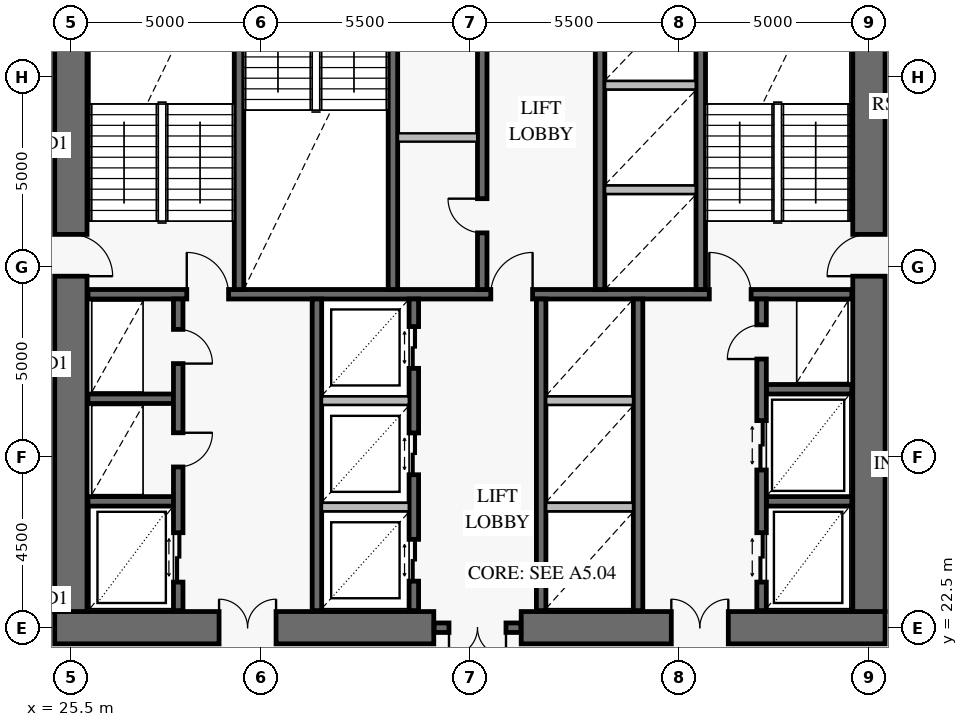
"""IFC4 building model, lengths in metres.
Left out: names, types, materials, properties, quantities, classifications, styles, units other than length and angle.
Written with IfcOpenShell. Run it as: python <this file> out.ifc"""

import sys

from ifc_helpers import new_model, si_unit, direction, frame, frame_2d, origin, place, context, subcontext, project, spatial, rectangle, extrude, element, fill, save


model = new_model("IFC4")
c1 = context("Model", 3, precision=1e-05, world=origin(), true_north=direction((0.0, 1.0)))
c2 = subcontext(c1, "Body", "Model", "MODEL_VIEW")
j1 = project(units=[si_unit("LENGTHUNIT", "METRE"), si_unit("PLANEANGLEUNIT", "RADIAN")], contexts=[c1])
p1 = place(None, origin())
s1 = spatial("IfcSite", under=j1, at=p1, CompositionType="ELEMENT")
p2 = place(p1, origin())
s2 = spatial("IfcBuilding", under=s1, at=p2, CompositionType="ELEMENT")
p3 = place(p2, frame((0.0, 0.0, 12.0)))
s3 = spatial("IfcBuildingStorey", under=s2, at=p3, CompositionType="ELEMENT", Elevation=12.0)
p4 = place(p3, frame((25.075, 22.5, 0.0), z_axis=(0.0, 0.0, 1.0), x_axis=(1.0, 0.0, 0.0)))
e1 = element("IfcWall", 1, at=p4, inside=s3, PredefinedType="SHEAR", context=c2, shape_type="SweptSolid", body=[
    extrude(rectangle(XDim=9.975, YDim=0.85, at=frame_2d((4.988, 0.0))), origin(), (0.0, 0.0, 1.0), 4.2),
])
p5 = place(p4, frame((4.325, 0.0, 0.0)))
e2 = element("IfcOpeningElement", 2, at=p5, cuts=e1, PredefinedType="OPENING", context=c2, shape_type="SweptSolid", body=[
    extrude(rectangle(XDim=1.5, YDim=2.15, at=frame_2d((0.75, 1.075))), frame((0.0, 0.437, 0.0), z_axis=(0.0, -1.0, 0.0), x_axis=(1.0, 0.0, 0.0)), (0.0, 0.0, 1.0), 0.874),
])
p6 = place(p3, frame((37.35, 22.5, 0.0), z_axis=(0.0, 0.0, 1.0), x_axis=(1.0, 0.0, 0.0)))
e3 = element("IfcWall", 3, at=p6, inside=s3, PredefinedType="SHEAR", context=c2, shape_type="SweptSolid", body=[
    extrude(rectangle(XDim=9.575, YDim=0.85, at=frame_2d((4.788, 0.0))), origin(), (0.0, 0.0, 1.0), 4.2),
])
p7 = place(p6, frame((3.95, 0.0, 0.0)))
e4 = element("IfcOpeningElement", 4, at=p7, cuts=e3, PredefinedType="OPENING", context=c2, shape_type="SweptSolid", body=[
    extrude(rectangle(XDim=1.5, YDim=2.15, at=frame_2d((0.75, 1.075))), frame((0.0, 0.437, 0.0), z_axis=(0.0, -1.0, 0.0), x_axis=(1.0, 0.0, 0.0)), (0.0, 0.0, 1.0), 0.874),
])
p8 = place(p3, frame((25.5, 22.925, 0.0), z_axis=(0.0, 0.0, 1.0), x_axis=(0.0, 1.0, 0.0)))
e5 = element("IfcWall", 5, at=p8, inside=s3, PredefinedType="SHEAR", context=c2, shape_type="SweptSolid", body=[
    extrude(rectangle(XDim=18.15, YDim=0.85, at=frame_2d((9.075, 0.0))), origin(), (0.0, 0.0, 1.0), 4.2),
])
p9 = place(p8, frame((8.825, 0.0, 0.0)))
e6 = element("IfcOpeningElement", 6, at=p9, cuts=e5, PredefinedType="OPENING", context=c2, shape_type="SweptSolid", body=[
    extrude(rectangle(XDim=1.1, YDim=2.15, at=frame_2d((0.55, 1.075))), frame((0.0, 0.437, 0.0), z_axis=(0.0, -1.0, 0.0), x_axis=(1.0, 0.0, 0.0)), (0.0, 0.0, 1.0), 0.874),
])
p10 = place(p3, frame((46.5, 22.925, 0.0), z_axis=(0.0, 0.0, 1.0), x_axis=(0.0, 1.0, 0.0)))
e7 = element("IfcWall", 7, at=p10, inside=s3, PredefinedType="SHEAR", context=c2, shape_type="SweptSolid", body=[
    extrude(rectangle(XDim=18.15, YDim=0.85, at=frame_2d((9.075, 0.0))), origin(), (0.0, 0.0, 1.0), 4.2),
])
p11 = place(p10, frame((8.825, 0.0, 0.0)))
e8 = element("IfcOpeningElement", 8, at=p11, cuts=e7, PredefinedType="OPENING", context=c2, shape_type="SweptSolid", body=[
    extrude(rectangle(XDim=1.1, YDim=2.15, at=frame_2d((0.55, 1.075))), frame((0.0, 0.437, 0.0), z_axis=(0.0, -1.0, 0.0), x_axis=(1.0, 0.0, 0.0)), (0.0, 0.0, 1.0), 0.874),
])
p12 = place(p3, frame((35.06, 22.5, 0.0), z_axis=(0.0, 0.0, 1.0), x_axis=(1.0, 0.0, 0.0)))
e9 = element("IfcWall", 9, at=p12, inside=s3, PredefinedType="SOLIDWALL", context=c2, shape_type="SweptSolid", body=[
    extrude(rectangle(XDim=2.28, YDim=0.25, at=frame_2d((1.14, 0.0))), origin(), (0.0, 0.0, 1.0), 4.2),
])
p13 = place(p12, frame((0.39, 0.0, 0.0)))
e10 = element("IfcOpeningElement", 10, at=p13, cuts=e9, PredefinedType="OPENING", context=c2, shape_type="SweptSolid", body=[
    extrude(rectangle(XDim=1.5, YDim=2.15, at=frame_2d((0.75, 1.075))), frame((0.0, 0.137, 0.0), z_axis=(0.0, -1.0, 0.0), x_axis=(1.0, 0.0, 0.0)), (0.0, 0.0, 1.0), 0.274),
])
p14 = place(p3, frame((25.95, 31.275, 0.0), z_axis=(0.0, 0.0, 1.0), x_axis=(1.0, 0.0, 0.0)))
e11 = element("IfcWall", 11, at=p14, inside=s3, PredefinedType="SOLIDWALL", context=c2, shape_type="SweptSolid", body=[
    extrude(rectangle(XDim=20.1, YDim=0.25, at=frame_2d((10.05, 0.0))), origin(), (0.0, 0.0, 1.0), 4.2),
])
p15 = place(p14, frame((2.6, 0.0, 0.0)))
e12 = element("IfcOpeningElement", 12, at=p15, cuts=e11, PredefinedType="OPENING", context=c2, shape_type="SweptSolid", body=[
    extrude(rectangle(XDim=1.1, YDim=2.15, at=frame_2d((0.55, 1.075))), frame((0.0, 0.137, 0.0), z_axis=(0.0, -1.0, 0.0), x_axis=(1.0, 0.0, 0.0)), (0.0, 0.0, 1.0), 0.274),
])
p16 = place(p14, frame((10.6, 0.0, 0.0)))
e13 = element("IfcOpeningElement", 13, at=p16, cuts=e11, PredefinedType="OPENING", context=c2, shape_type="SweptSolid", body=[
    extrude(rectangle(XDim=1.1, YDim=2.15, at=frame_2d((0.55, 1.075))), frame((0.0, 0.137, 0.0), z_axis=(0.0, -1.0, 0.0), x_axis=(1.0, 0.0, 0.0)), (0.0, 0.0, 1.0), 0.274),
])
p17 = place(p14, frame((16.35, 0.0, 0.0)))
e14 = element("IfcOpeningElement", 14, at=p17, cuts=e11, PredefinedType="OPENING", context=c2, shape_type="SweptSolid", body=[
    extrude(rectangle(XDim=1.1, YDim=2.15, at=frame_2d((0.55, 1.075))), frame((0.0, 0.137, 0.0), z_axis=(0.0, -1.0, 0.0), x_axis=(1.0, 0.0, 0.0)), (0.0, 0.0, 1.0), 0.274),
])
for number, where, z_axis, x_axis in (
    (15, (29.925, 31.4, 0.0), (0.0, 0.0, 1.0), (0.0, 1.0, 0.0)),
    (16, (33.975, 31.4, 0.0), (0.0, 0.0, 1.0), (0.0, 1.0, 0.0)),
    (17, (42.075, 31.4, 0.0), (0.0, 0.0, 1.0), (0.0, 1.0, 0.0)),
):
    element("IfcWall", number, at=place(p3, frame(where, z_axis=z_axis, x_axis=x_axis)), inside=s3, PredefinedType="SOLIDWALL", context=c2, shape_type="SweptSolid", body=[
        extrude(rectangle(XDim=9.7, YDim=0.25, at=frame_2d((4.85, 0.0))), origin(), (0.0, 0.0, 1.0), 4.2),
    ])
p18 = place(p3, frame((36.325, 31.4, 0.0), z_axis=(0.0, 0.0, 1.0), x_axis=(0.0, 1.0, 0.0)))
e18 = element("IfcWall", 18, at=p18, inside=s3, PredefinedType="SOLIDWALL", context=c2, shape_type="SweptSolid", body=[
    extrude(rectangle(XDim=9.65, YDim=0.25, at=frame_2d((4.825, 0.0))), origin(), (0.0, 0.0, 1.0), 4.2),
])
p19 = place(p18, frame((1.49, 0.0, 0.0)))
e19 = element("IfcOpeningElement", 19, at=p19, cuts=e18, PredefinedType="OPENING", context=c2, shape_type="SweptSolid", body=[
    extrude(rectangle(XDim=0.9, YDim=2.1, at=frame_2d((0.45, 1.05))), frame((0.0, 0.137, 0.0), z_axis=(0.0, -1.0, 0.0), x_axis=(1.0, 0.0, 0.0)), (0.0, 0.0, 1.0), 0.274),
])
p20 = place(p18, frame((6.41, 0.0, 0.0)))
e20 = element("IfcOpeningElement", 20, at=p20, cuts=e18, PredefinedType="OPENING", context=c2, shape_type="SweptSolid", body=[
    extrude(rectangle(XDim=0.9, YDim=2.1, at=frame_2d((0.45, 1.05))), frame((0.0, 0.137, 0.0), z_axis=(0.0, -1.0, 0.0), x_axis=(1.0, 0.0, 0.0)), (0.0, 0.0, 1.0), 0.274),
])
p21 = place(p3, frame((39.425, 31.4, 0.0), z_axis=(0.0, 0.0, 1.0), x_axis=(0.0, 1.0, 0.0)))
e21 = element("IfcWall", 21, at=p21, inside=s3, PredefinedType="SOLIDWALL", context=c2, shape_type="SweptSolid", body=[
    extrude(rectangle(XDim=9.65, YDim=0.25, at=frame_2d((4.825, 0.0))), origin(), (0.0, 0.0, 1.0), 4.2),
])
p22 = place(p21, frame((8.47, 0.0, 0.0)))
e22 = element("IfcOpeningElement", 22, at=p22, cuts=e21, PredefinedType="OPENING", context=c2, shape_type="SweptSolid", body=[
    extrude(rectangle(XDim=0.9, YDim=2.1, at=frame_2d((0.45, 1.05))), frame((0.0, 0.137, 0.0), z_axis=(0.0, -1.0, 0.0), x_axis=(1.0, 0.0, 0.0)), (0.0, 0.0, 1.0), 0.274),
])
for number, where, z_axis, x_axis in (
    (23, (25.95, 25.825, 0.0), (0.0, 0.0, 1.0), (1.0, 0.0, 0.0)),
    (24, (25.95, 28.525, 0.0), (0.0, 0.0, 1.0), (1.0, 0.0, 0.0)),
):
    element("IfcWall", number, at=place(p3, frame(where, z_axis=z_axis, x_axis=x_axis)), inside=s3, PredefinedType="SOLIDWALL", context=c2, shape_type="SweptSolid", body=[
        extrude(rectangle(XDim=2.25, YDim=0.25, at=frame_2d((1.125, 0.0))), origin(), (0.0, 0.0, 1.0), 4.2),
    ])
p23 = place(p3, frame((28.325, 22.95, 0.0), z_axis=(0.0, 0.0, 1.0), x_axis=(0.0, 1.0, 0.0)))
e25 = element("IfcWall", 25, at=p23, inside=s3, PredefinedType="SOLIDWALL", context=c2, shape_type="SweptSolid", body=[
    extrude(rectangle(XDim=8.2, YDim=0.25, at=frame_2d((4.1, 0.0))), origin(), (0.0, 0.0, 1.0), 4.2),
])
p24 = place(p23, frame((0.75, 0.0, 0.0)))
e26 = element("IfcOpeningElement", 26, at=p24, cuts=e25, PredefinedType="OPENING", context=c2, shape_type="SweptSolid", body=[
    extrude(rectangle(XDim=1.3, YDim=2.3, at=frame_2d((0.65, 1.15))), frame((0.0, 0.137, 0.0), z_axis=(0.0, -1.0, 0.0), x_axis=(1.0, 0.0, 0.0)), (0.0, 0.0, 1.0), 0.274),
])
p25 = place(p23, frame((3.78, 0.0, 0.0)))
e27 = element("IfcOpeningElement", 27, at=p25, cuts=e25, PredefinedType="OPENING", context=c2, shape_type="SweptSolid", body=[
    extrude(rectangle(XDim=0.9, YDim=2.1, at=frame_2d((0.45, 1.05))), frame((0.0, 0.137, 0.0), z_axis=(0.0, -1.0, 0.0), x_axis=(1.0, 0.0, 0.0)), (0.0, 0.0, 1.0), 0.274),
])
p26 = place(p23, frame((6.5, 0.0, 0.0)))
e28 = element("IfcOpeningElement", 28, at=p26, cuts=e25, PredefinedType="OPENING", context=c2, shape_type="SweptSolid", body=[
    extrude(rectangle(XDim=0.9, YDim=2.1, at=frame_2d((0.45, 1.05))), frame((0.0, 0.137, 0.0), z_axis=(0.0, -1.0, 0.0), x_axis=(1.0, 0.0, 0.0)), (0.0, 0.0, 1.0), 0.274),
])
p27 = place(p3, frame((31.975, 22.95, 0.0), z_axis=(0.0, 0.0, 1.0), x_axis=(0.0, 1.0, 0.0)))
e29 = element("IfcWall", 29, at=p27, inside=s3, PredefinedType="SOLIDWALL", context=c2, shape_type="SweptSolid", body=[
    extrude(rectangle(XDim=8.2, YDim=0.25, at=frame_2d((4.1, 0.0))), origin(), (0.0, 0.0, 1.0), 4.2),
])
p28 = place(p3, frame((34.525, 22.95, 0.0), z_axis=(0.0, 0.0, 1.0), x_axis=(0.0, 1.0, 0.0)))
e30 = element("IfcWall", 30, at=p28, inside=s3, PredefinedType="SOLIDWALL", context=c2, shape_type="SweptSolid", body=[
    extrude(rectangle(XDim=8.2, YDim=0.25, at=frame_2d((4.1, 0.0))), origin(), (0.0, 0.0, 1.0), 4.2),
])
p29 = place(p28, frame((0.775, 0.0, 0.0)))
e31 = element("IfcOpeningElement", 31, at=p29, cuts=e30, PredefinedType="OPENING", context=c2, shape_type="SweptSolid", body=[
    extrude(rectangle(XDim=1.1, YDim=2.2, at=frame_2d((0.55, 1.1))), frame((0.0, 0.137, 0.0), z_axis=(0.0, -1.0, 0.0), x_axis=(1.0, 0.0, 0.0)), (0.0, 0.0, 1.0), 0.274),
])
p30 = place(p28, frame((3.575, 0.0, 0.0)))
e32 = element("IfcOpeningElement", 32, at=p30, cuts=e30, PredefinedType="OPENING", context=c2, shape_type="SweptSolid", body=[
    extrude(rectangle(XDim=1.1, YDim=2.2, at=frame_2d((0.55, 1.1))), frame((0.0, 0.137, 0.0), z_axis=(0.0, -1.0, 0.0), x_axis=(1.0, 0.0, 0.0)), (0.0, 0.0, 1.0), 0.274),
])
p31 = place(p28, frame((6.375, 0.0, 0.0)))
e33 = element("IfcOpeningElement", 33, at=p31, cuts=e30, PredefinedType="OPENING", context=c2, shape_type="SweptSolid", body=[
    extrude(rectangle(XDim=1.1, YDim=2.2, at=frame_2d((0.55, 1.1))), frame((0.0, 0.137, 0.0), z_axis=(0.0, -1.0, 0.0), x_axis=(1.0, 0.0, 0.0)), (0.0, 0.0, 1.0), 0.274),
])
for number, where, z_axis, x_axis in (
    (34, (37.875, 22.95, 0.0), (0.0, 0.0, 1.0), (0.0, 1.0, 0.0)),
    (35, (40.425, 22.95, 0.0), (0.0, 0.0, 1.0), (0.0, 1.0, 0.0)),
):
    element("IfcWall", number, at=place(p3, frame(where, z_axis=z_axis, x_axis=x_axis)), inside=s3, PredefinedType="SOLIDWALL", context=c2, shape_type="SweptSolid", body=[
        extrude(rectangle(XDim=8.2, YDim=0.25, at=frame_2d((4.1, 0.0))), origin(), (0.0, 0.0, 1.0), 4.2),
    ])
for number, where, z_axis, x_axis in (
    (36, (43.8, 25.825, 0.0), (0.0, 0.0, 1.0), (1.0, 0.0, 0.0)),
    (37, (43.8, 28.775, 0.0), (0.0, 0.0, 1.0), (1.0, 0.0, 0.0)),
):
    element("IfcWall", number, at=place(p3, frame(where, z_axis=z_axis, x_axis=x_axis)), inside=s3, PredefinedType="SOLIDWALL", context=c2, shape_type="SweptSolid", body=[
        extrude(rectangle(XDim=2.25, YDim=0.25, at=frame_2d((1.125, 0.0))), origin(), (0.0, 0.0, 1.0), 4.2),
    ])
p32 = place(p3, frame((43.675, 22.95, 0.0), z_axis=(0.0, 0.0, 1.0), x_axis=(0.0, 1.0, 0.0)))
e38 = element("IfcWall", 38, at=p32, inside=s3, PredefinedType="SOLIDWALL", context=c2, shape_type="SweptSolid", body=[
    extrude(rectangle(XDim=8.2, YDim=0.25, at=frame_2d((4.1, 0.0))), origin(), (0.0, 0.0, 1.0), 4.2),
])
p33 = place(p32, frame((0.75, 0.0, 0.0)))
e39 = element("IfcOpeningElement", 39, at=p33, cuts=e38, PredefinedType="OPENING", context=c2, shape_type="SweptSolid", body=[
    extrude(rectangle(XDim=1.3, YDim=2.3, at=frame_2d((0.65, 1.15))), frame((0.0, 0.137, 0.0), z_axis=(0.0, -1.0, 0.0), x_axis=(1.0, 0.0, 0.0)), (0.0, 0.0, 1.0), 0.274),
])
p34 = place(p32, frame((3.7, 0.0, 0.0)))
e40 = element("IfcOpeningElement", 40, at=p34, cuts=e38, PredefinedType="OPENING", context=c2, shape_type="SweptSolid", body=[
    extrude(rectangle(XDim=1.3, YDim=2.3, at=frame_2d((0.65, 1.15))), frame((0.0, 0.137, 0.0), z_axis=(0.0, -1.0, 0.0), x_axis=(1.0, 0.0, 0.0)), (0.0, 0.0, 1.0), 0.274),
])
p35 = place(p32, frame((6.62, 0.0, 0.0)))
e41 = element("IfcOpeningElement", 41, at=p35, cuts=e38, PredefinedType="OPENING", context=c2, shape_type="SweptSolid", body=[
    extrude(rectangle(XDim=0.9, YDim=2.1, at=frame_2d((0.45, 1.05))), frame((0.0, 0.137, 0.0), z_axis=(0.0, -1.0, 0.0), x_axis=(1.0, 0.0, 0.0)), (0.0, 0.0, 1.0), 0.274),
])
p36 = place(p3, frame((34.108, 35.4, 0.0), z_axis=(0.0, 0.0, 1.0), x_axis=(1.0, 0.0, 0.0)))
e42 = element("IfcWall", 42, at=p36, inside=s3, PredefinedType="PARTITIONING", context=c2, shape_type="SweptSolid", body=[
    extrude(rectangle(XDim=2.084, YDim=0.22, at=frame_2d((1.042, 0.0))), origin(), (0.0, 0.0, 1.0), 3.92),
])
for number, where, z_axis, x_axis in (
    (43, (39.558, 34.025, 0.0), (0.0, 0.0, 1.0), (1.0, 0.0, 0.0)),
    (44, (39.558, 36.775, 0.0), (0.0, 0.0, 1.0), (1.0, 0.0, 0.0)),
):
    element("IfcWall", number, at=place(p3, frame(where, z_axis=z_axis, x_axis=x_axis)), inside=s3, PredefinedType="PARTITIONING", context=c2, shape_type="SweptSolid", body=[
        extrude(rectangle(XDim=2.384, YDim=0.22, at=frame_2d((1.192, 0.0))), origin(), (0.0, 0.0, 1.0), 3.92),
    ])
for number, where, z_axis, x_axis in (
    (45, (32.108, 25.675, 0.0), (0.0, 0.0, 1.0), (1.0, 0.0, 0.0)),
    (46, (32.108, 28.475, 0.0), (0.0, 0.0, 1.0), (1.0, 0.0, 0.0)),
):
    element("IfcWall", number, at=place(p3, frame(where, z_axis=z_axis, x_axis=x_axis)), inside=s3, PredefinedType="PARTITIONING", context=c2, shape_type="SweptSolid", body=[
        extrude(rectangle(XDim=2.284, YDim=0.22, at=frame_2d((1.142, 0.0))), origin(), (0.0, 0.0, 1.0), 3.92),
    ])
for number, where, z_axis, x_axis in (
    (47, (38.008, 25.675, 0.0), (0.0, 0.0, 1.0), (1.0, 0.0, 0.0)),
    (48, (38.008, 28.475, 0.0), (0.0, 0.0, 1.0), (1.0, 0.0, 0.0)),
):
    element("IfcWall", number, at=place(p3, frame(where, z_axis=z_axis, x_axis=x_axis)), inside=s3, PredefinedType="PARTITIONING", context=c2, shape_type="SweptSolid", body=[
        extrude(rectangle(XDim=2.284, YDim=0.22, at=frame_2d((1.142, 0.0))), origin(), (0.0, 0.0, 1.0), 3.92),
    ])
p37 = place(p9, frame((1.1, 0.0, 0.0), z_axis=(0.0, 0.0, 1.0), x_axis=(-1.0, 0.0, 0.0)))
e49 = element("IfcDoor", 49, at=p37, inside=s3, OperationType="SINGLE_SWING_RIGHT", PredefinedType="USERDEFINED", context=c2, shape_type="SweptSolid", body=[
    extrude(rectangle(XDim=1.1, YDim=2.15, at=frame_2d((0.55, 1.075))), frame((0.0, 0.025, 0.0), z_axis=(0.0, -1.0, 0.0), x_axis=(1.0, 0.0, 0.0)), (0.0, 0.0, 1.0), 0.05),
])
fill(e6, e49)
p38 = place(p11, origin())
e50 = element("IfcDoor", 50, at=p38, inside=s3, OperationType="SINGLE_SWING_LEFT", PredefinedType="USERDEFINED", context=c2, shape_type="SweptSolid", body=[
    extrude(rectangle(XDim=1.1, YDim=2.15, at=frame_2d((0.55, 1.075))), frame((0.0, 0.025, 0.0), z_axis=(0.0, -1.0, 0.0), x_axis=(1.0, 0.0, 0.0)), (0.0, 0.0, 1.0), 0.05),
])
fill(e8, e50)
p39 = place(p5, origin())
e51 = element("IfcDoor", 51, at=p39, inside=s3, OperationType="DOUBLE_DOOR_SINGLE_SWING", PredefinedType="DOOR", context=c2, shape_type="SweptSolid", body=[
    extrude(rectangle(XDim=1.5, YDim=2.15, at=frame_2d((0.75, 1.075))), frame((0.0, 0.025, 0.0), z_axis=(0.0, -1.0, 0.0), x_axis=(1.0, 0.0, 0.0)), (0.0, 0.0, 1.0), 0.05),
])
fill(e2, e51)
p40 = place(p7, origin())
e52 = element("IfcDoor", 52, at=p40, inside=s3, OperationType="DOUBLE_DOOR_SINGLE_SWING", PredefinedType="DOOR", context=c2, shape_type="SweptSolid", body=[
    extrude(rectangle(XDim=1.5, YDim=2.15, at=frame_2d((0.75, 1.075))), frame((0.0, 0.025, 0.0), z_axis=(0.0, -1.0, 0.0), x_axis=(1.0, 0.0, 0.0)), (0.0, 0.0, 1.0), 0.05),
])
fill(e4, e52)
p41 = place(p13, frame((1.5, 0.0, 0.0), z_axis=(0.0, 0.0, 1.0), x_axis=(-1.0, 0.0, 0.0)))
e53 = element("IfcDoor", 53, at=p41, inside=s3, OperationType="DOUBLE_DOOR_SINGLE_SWING", PredefinedType="DOOR", context=c2, shape_type="SweptSolid", body=[
    extrude(rectangle(XDim=1.5, YDim=2.15, at=frame_2d((0.75, 1.075))), frame((0.0, 0.025, 0.0), z_axis=(0.0, -1.0, 0.0), x_axis=(1.0, 0.0, 0.0)), (0.0, 0.0, 1.0), 0.05),
])
fill(e10, e53)
p42 = place(p15, origin())
e54 = element("IfcDoor", 54, at=p42, inside=s3, OperationType="SINGLE_SWING_LEFT", PredefinedType="USERDEFINED", context=c2, shape_type="SweptSolid", body=[
    extrude(rectangle(XDim=1.1, YDim=2.15, at=frame_2d((0.55, 1.075))), frame((0.0, 0.025, 0.0), z_axis=(0.0, -1.0, 0.0), x_axis=(1.0, 0.0, 0.0)), (0.0, 0.0, 1.0), 0.05),
])
fill(e12, e54)
p43 = place(p16, origin())
e55 = element("IfcDoor", 55, at=p43, inside=s3, OperationType="SINGLE_SWING_RIGHT", PredefinedType="USERDEFINED", context=c2, shape_type="SweptSolid", body=[
    extrude(rectangle(XDim=1.1, YDim=2.15, at=frame_2d((0.55, 1.075))), frame((0.0, 0.025, 0.0), z_axis=(0.0, -1.0, 0.0), x_axis=(1.0, 0.0, 0.0)), (0.0, 0.0, 1.0), 0.05),
])
fill(e13, e55)
p44 = place(p17, origin())
e56 = element("IfcDoor", 56, at=p44, inside=s3, OperationType="SINGLE_SWING_LEFT", PredefinedType="USERDEFINED", context=c2, shape_type="SweptSolid", body=[
    extrude(rectangle(XDim=1.1, YDim=2.15, at=frame_2d((0.55, 1.075))), frame((0.0, 0.025, 0.0), z_axis=(0.0, -1.0, 0.0), x_axis=(1.0, 0.0, 0.0)), (0.0, 0.0, 1.0), 0.05),
])
fill(e14, e56)
p45 = place(p19, origin())
e57 = element("IfcDoor", 57, at=p45, inside=s3, OperationType="SINGLE_SWING_RIGHT", PredefinedType="DOOR", context=c2, shape_type="SweptSolid", body=[
    extrude(rectangle(XDim=0.9, YDim=2.1, at=frame_2d((0.45, 1.05))), frame((0.0, 0.025, 0.0), z_axis=(0.0, -1.0, 0.0), x_axis=(1.0, 0.0, 0.0)), (0.0, 0.0, 1.0), 0.05),
])
fill(e19, e57)
p46 = place(p24, frame((1.3, 0.0, 0.0), z_axis=(0.0, 0.0, 1.0), x_axis=(-1.0, 0.0, 0.0)))
e58 = element("IfcDoor", 58, at=p46, inside=s3, OperationType="DOUBLE_DOOR_SLIDING", PredefinedType="DOOR", context=c2, shape_type="SweptSolid", body=[
    extrude(rectangle(XDim=1.3, YDim=2.3, at=frame_2d((0.65, 1.15))), frame((0.0, 0.025, 0.0), z_axis=(0.0, -1.0, 0.0), x_axis=(1.0, 0.0, 0.0)), (0.0, 0.0, 1.0), 0.05),
])
fill(e26, e58)
p47 = place(p25, frame((0.9, 0.0, 0.0), z_axis=(0.0, 0.0, 1.0), x_axis=(-1.0, 0.0, 0.0)))
e59 = element("IfcDoor", 59, at=p47, inside=s3, OperationType="SINGLE_SWING_LEFT", PredefinedType="DOOR", context=c2, shape_type="SweptSolid", body=[
    extrude(rectangle(XDim=0.9, YDim=2.1, at=frame_2d((0.45, 1.05))), frame((0.0, 0.025, 0.0), z_axis=(0.0, -1.0, 0.0), x_axis=(1.0, 0.0, 0.0)), (0.0, 0.0, 1.0), 0.05),
])
fill(e27, e59)
p48 = place(p26, frame((0.9, 0.0, 0.0), z_axis=(0.0, 0.0, 1.0), x_axis=(-1.0, 0.0, 0.0)))
e60 = element("IfcDoor", 60, at=p48, inside=s3, OperationType="SINGLE_SWING_RIGHT", PredefinedType="DOOR", context=c2, shape_type="SweptSolid", body=[
    extrude(rectangle(XDim=0.9, YDim=2.1, at=frame_2d((0.45, 1.05))), frame((0.0, 0.025, 0.0), z_axis=(0.0, -1.0, 0.0), x_axis=(1.0, 0.0, 0.0)), (0.0, 0.0, 1.0), 0.05),
])
fill(e28, e60)
p49 = place(p29, frame((1.1, 0.0, 0.0), z_axis=(0.0, 0.0, 1.0), x_axis=(-1.0, 0.0, 0.0)))
e61 = element("IfcDoor", 61, at=p49, inside=s3, OperationType="DOUBLE_DOOR_SLIDING", PredefinedType="DOOR", context=c2, shape_type="SweptSolid", body=[
    extrude(rectangle(XDim=1.1, YDim=2.2, at=frame_2d((0.55, 1.1))), frame((0.0, 0.025, 0.0), z_axis=(0.0, -1.0, 0.0), x_axis=(1.0, 0.0, 0.0)), (0.0, 0.0, 1.0), 0.05),
])
fill(e31, e61)
p50 = place(p30, frame((1.1, 0.0, 0.0), z_axis=(0.0, 0.0, 1.0), x_axis=(-1.0, 0.0, 0.0)))
e62 = element("IfcDoor", 62, at=p50, inside=s3, OperationType="DOUBLE_DOOR_SLIDING", PredefinedType="DOOR", context=c2, shape_type="SweptSolid", body=[
    extrude(rectangle(XDim=1.1, YDim=2.2, at=frame_2d((0.55, 1.1))), frame((0.0, 0.025, 0.0), z_axis=(0.0, -1.0, 0.0), x_axis=(1.0, 0.0, 0.0)), (0.0, 0.0, 1.0), 0.05),
])
fill(e32, e62)
p51 = place(p31, frame((1.1, 0.0, 0.0), z_axis=(0.0, 0.0, 1.0), x_axis=(-1.0, 0.0, 0.0)))
e63 = element("IfcDoor", 63, at=p51, inside=s3, OperationType="DOUBLE_DOOR_SLIDING", PredefinedType="DOOR", context=c2, shape_type="SweptSolid", body=[
    extrude(rectangle(XDim=1.1, YDim=2.2, at=frame_2d((0.55, 1.1))), frame((0.0, 0.025, 0.0), z_axis=(0.0, -1.0, 0.0), x_axis=(1.0, 0.0, 0.0)), (0.0, 0.0, 1.0), 0.05),
])
fill(e33, e63)
p52 = place(p33, origin())
e64 = element("IfcDoor", 64, at=p52, inside=s3, OperationType="DOUBLE_DOOR_SLIDING", PredefinedType="DOOR", context=c2, shape_type="SweptSolid", body=[
    extrude(rectangle(XDim=1.3, YDim=2.3, at=frame_2d((0.65, 1.15))), frame((0.0, 0.025, 0.0), z_axis=(0.0, -1.0, 0.0), x_axis=(1.0, 0.0, 0.0)), (0.0, 0.0, 1.0), 0.05),
])
fill(e39, e64)
p53 = place(p34, origin())
e65 = element("IfcDoor", 65, at=p53, inside=s3, OperationType="DOUBLE_DOOR_SLIDING", PredefinedType="DOOR", context=c2, shape_type="SweptSolid", body=[
    extrude(rectangle(XDim=1.3, YDim=2.3, at=frame_2d((0.65, 1.15))), frame((0.0, 0.025, 0.0), z_axis=(0.0, -1.0, 0.0), x_axis=(1.0, 0.0, 0.0)), (0.0, 0.0, 1.0), 0.05),
])
fill(e40, e65)
p54 = place(p35, origin())
e66 = element("IfcDoor", 66, at=p54, inside=s3, OperationType="SINGLE_SWING_LEFT", PredefinedType="DOOR", context=c2, shape_type="SweptSolid", body=[
    extrude(rectangle(XDim=0.9, YDim=2.1, at=frame_2d((0.45, 1.05))), frame((0.0, 0.025, 0.0), z_axis=(0.0, -1.0, 0.0), x_axis=(1.0, 0.0, 0.0)), (0.0, 0.0, 1.0), 0.05),
])
fill(e41, e66)
save(model, sys.argv[1])
